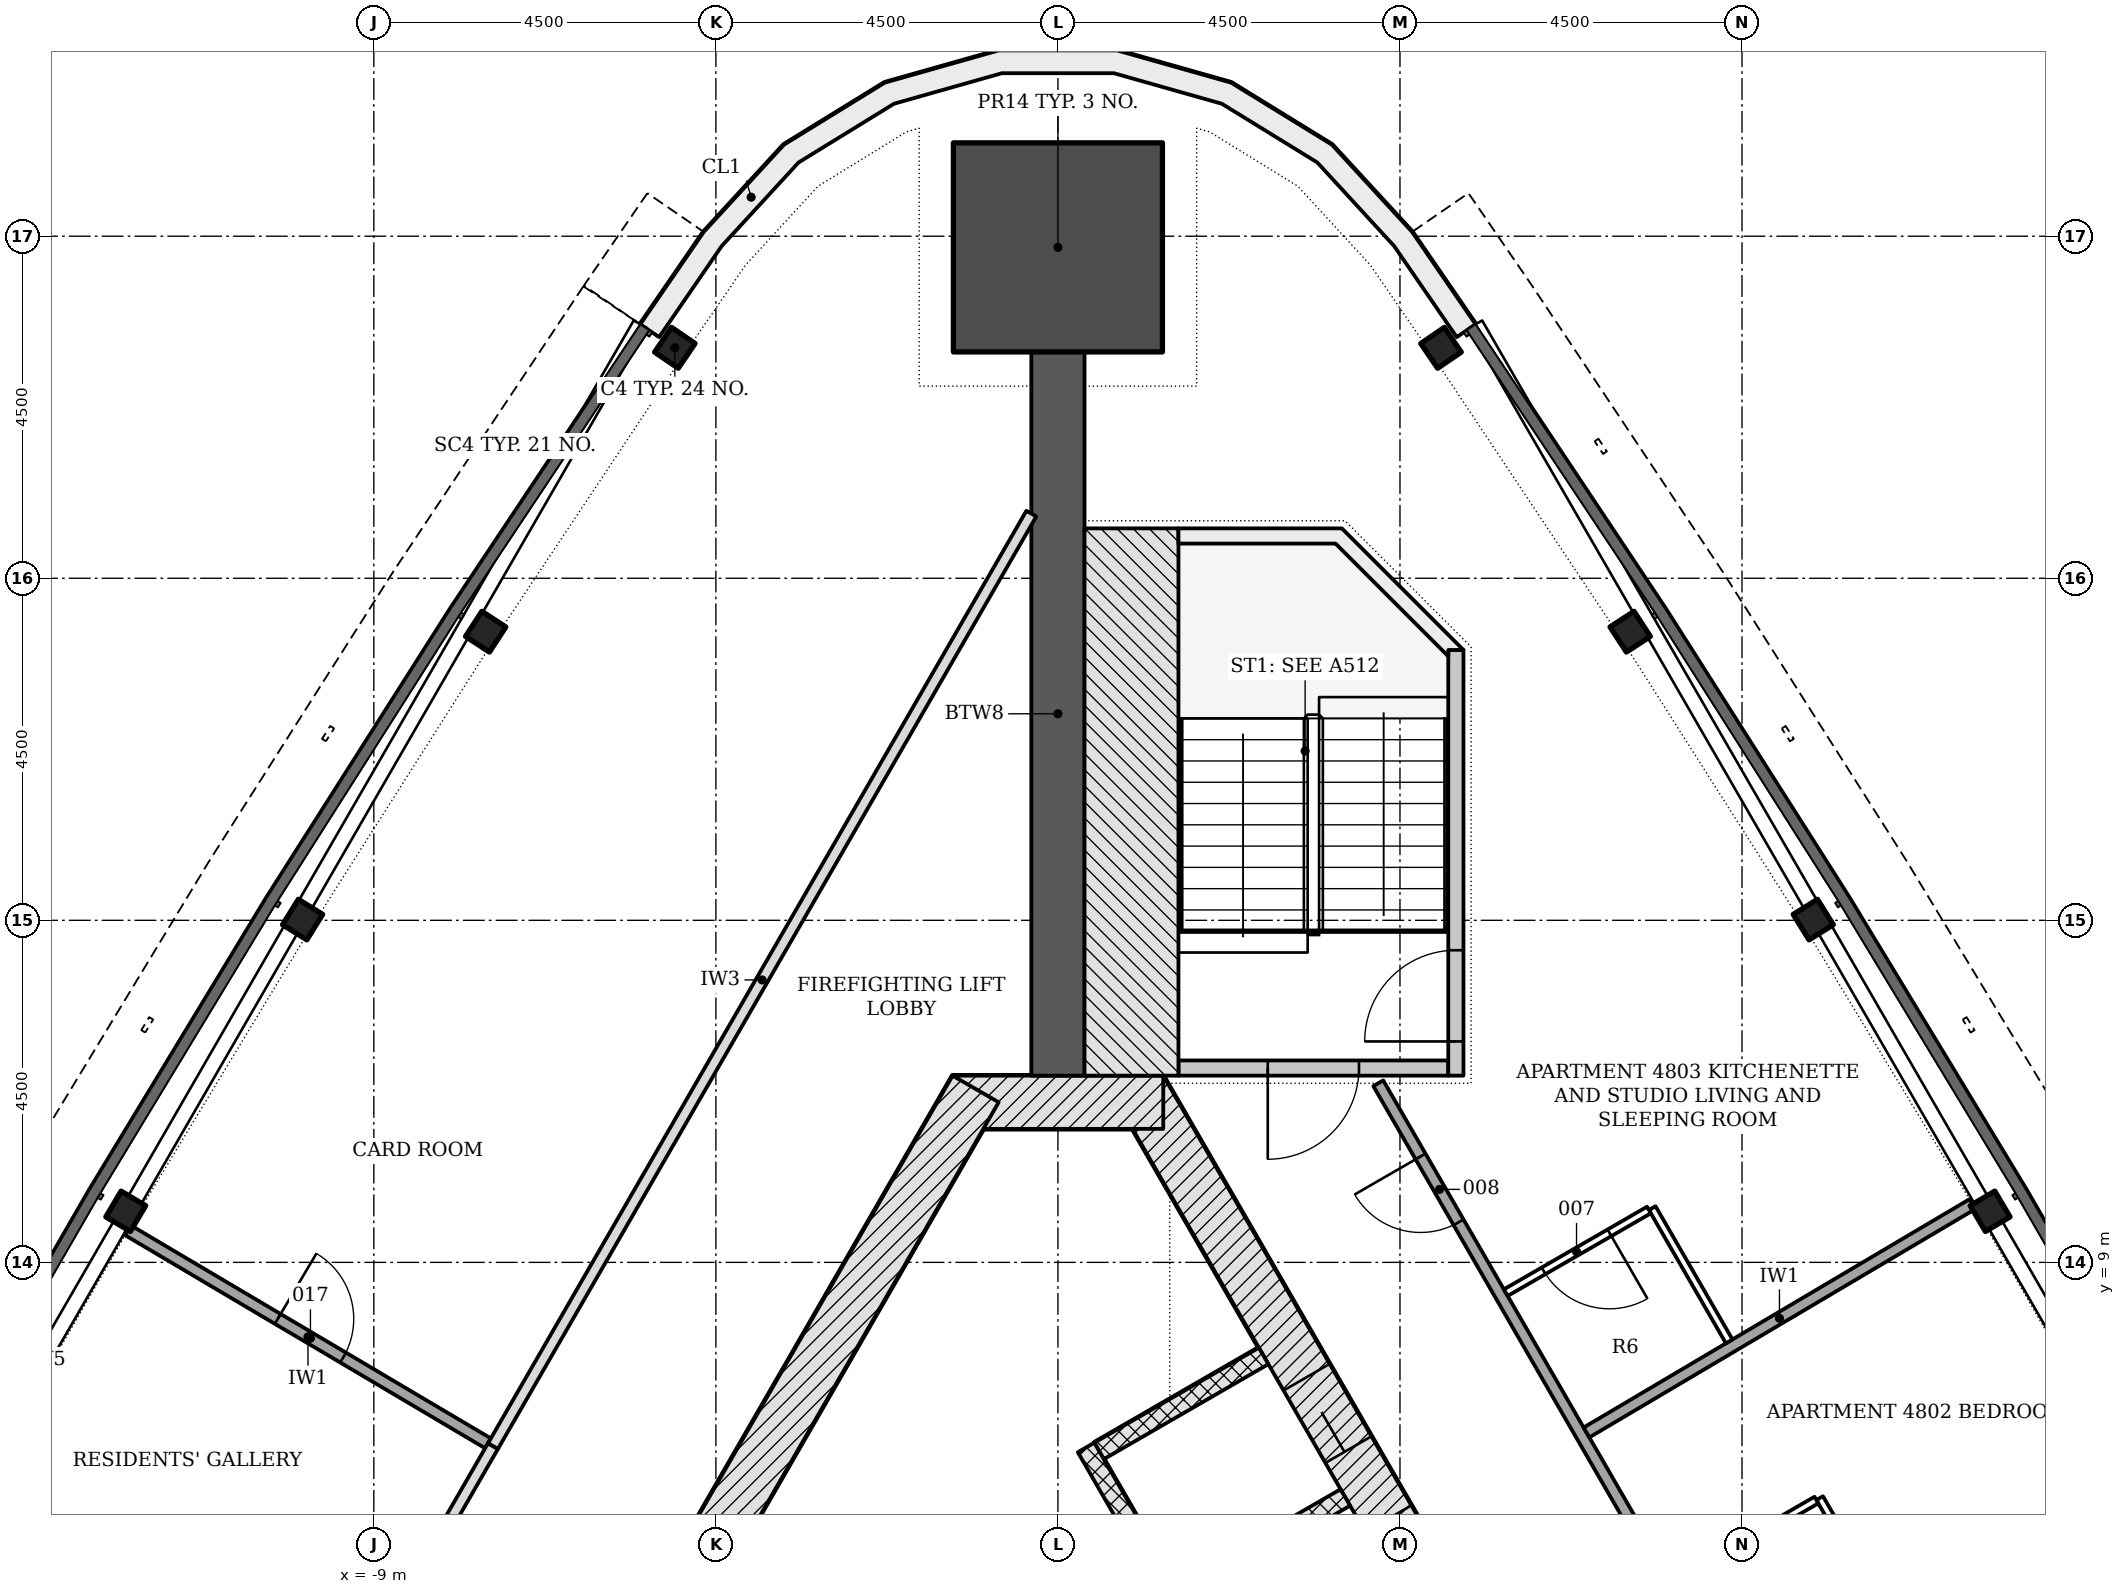
"""IFC4 building model, lengths in metres.
Left out: names, types, materials, properties, quantities, classifications, styles, units other than length and angle.
Written with IfcOpenShell. Run it as: python <this file> out.ifc"""

import sys

from ifc_helpers import new_model, si_unit, direction, frame, frame_2d, origin, origin_2d, place, context, subcontext, project, spatial, polyline, rectangle, i_section, outline, extrude, element, fill, save


model = new_model("IFC4")
c1 = context("Model", 3, precision=1e-05, world=origin(), true_north=direction((0.0, 1.0)))
c2 = subcontext(c1, "Body", "Model", "MODEL_VIEW")
j1 = project(units=[si_unit("LENGTHUNIT", "METRE"), si_unit("PLANEANGLEUNIT", "RADIAN")], contexts=[c1])
p1 = place(None, origin())
s1 = spatial("IfcSite", under=j1, at=p1, CompositionType="ELEMENT")
p2 = place(p1, origin())
s2 = spatial("IfcBuilding", under=s1, at=p2, CompositionType="ELEMENT")
p3 = place(p2, frame((0.0, 0.0, 188.7)))
s3 = spatial("IfcBuildingStorey", under=s2, at=p3, CompositionType="ELEMENT", Elevation=188.7)
p4 = place(p3, frame((10.311, -4.703, -0.2), z_axis=(0.0, 0.0, 1.0), x_axis=(-0.500001446645, 0.866024568562, 0.0)))
e1 = element("IfcWall", 1, at=p4, inside=s3, PredefinedType="SHEAR", context=c2, shape_type="SweptSolid", body=[
    extrude(rectangle(XDim=18.458, YDim=0.7, at=frame_2d((9.229, 0.0))), origin(), (0.0, 0.0, 1.0), 3.6),
])
p5 = place(p4, frame((4.379, 0.0, 0.2)))
e2 = element("IfcOpeningElement", 2, at=p5, cuts=e1, PredefinedType="OPENING", context=c2, shape_type="SweptSolid", body=[
    extrude(rectangle(XDim=1.1, YDim=2.1, at=frame_2d((0.55, 1.05))), frame((0.0, 0.36, 0.0), z_axis=(0.0, -1.0, 0.0), x_axis=(1.0, 0.0, 0.0)), (0.0, 0.0, 1.0), 0.72),
])
p6 = place(p4, frame((6.529, 0.0, 0.2)))
e3 = element("IfcOpeningElement", 3, at=p6, cuts=e1, PredefinedType="OPENING", context=c2, shape_type="SweptSolid", body=[
    extrude(rectangle(XDim=1.1, YDim=2.1, at=frame_2d((0.55, 1.05))), frame((0.0, 0.36, 0.0), z_axis=(0.0, -1.0, 0.0), x_axis=(1.0, 0.0, 0.0)), (0.0, 0.0, 1.0), 0.72),
])
p7 = place(p4, frame((8.679, 0.0, 0.2)))
e4 = element("IfcOpeningElement", 4, at=p7, cuts=e1, PredefinedType="OPENING", context=c2, shape_type="SweptSolid", body=[
    extrude(rectangle(XDim=1.1, YDim=2.1, at=frame_2d((0.55, 1.05))), frame((0.0, 0.36, 0.0), z_axis=(0.0, -1.0, 0.0), x_axis=(1.0, 0.0, 0.0)), (0.0, 0.0, 1.0), 0.72),
])
p8 = place(p4, frame((10.829, 0.0, 0.2)))
e5 = element("IfcOpeningElement", 5, at=p8, cuts=e1, PredefinedType="OPENING", context=c2, shape_type="SweptSolid", body=[
    extrude(rectangle(XDim=1.1, YDim=2.1, at=frame_2d((0.55, 1.05))), frame((0.0, 0.36, 0.0), z_axis=(0.0, -1.0, 0.0), x_axis=(1.0, 0.0, 0.0)), (0.0, 0.0, 1.0), 0.72),
])
p9 = place(p4, frame((12.979, 0.0, 0.2)))
e6 = element("IfcOpeningElement", 6, at=p9, cuts=e1, PredefinedType="OPENING", context=c2, shape_type="SweptSolid", body=[
    extrude(rectangle(XDim=1.1, YDim=2.1, at=frame_2d((0.55, 1.05))), frame((0.0, 0.36, 0.0), z_axis=(0.0, -1.0, 0.0), x_axis=(1.0, 0.0, 0.0)), (0.0, 0.0, 1.0), 0.72),
])
p10 = place(p3, frame((1.386, 11.106, -0.2), z_axis=(0.0, 0.0, 1.0), x_axis=(-1.0, 0.0, 0.0)))
e7 = element("IfcWall", 7, at=p10, inside=s3, PredefinedType="SHEAR", context=c2, shape_type="SweptSolid", body=[
    extrude(rectangle(XDim=2.771, YDim=0.7, at=frame_2d((1.386, 0.0))), origin(), (0.0, 0.0, 1.0), 3.6),
])
p11 = place(p3, frame((-1.083, 11.281, -0.2), z_axis=(0.0, 0.0, 1.0), x_axis=(-0.500001446645, -0.866024568562, 0.0)))
e8 = element("IfcWall", 8, at=p11, inside=s3, PredefinedType="SHEAR", context=c2, shape_type="SweptSolid", body=[
    extrude(rectangle(XDim=18.458, YDim=0.7, at=frame_2d((9.229, 0.0))), origin(), (0.0, 0.0, 1.0), 3.6),
])
p12 = place(p11, frame((8.979, 0.0, 0.2)))
e9 = element("IfcOpeningElement", 9, at=p12, cuts=e8, PredefinedType="OPENING", context=c2, shape_type="SweptSolid", body=[
    extrude(rectangle(XDim=1.2, YDim=2.1, at=frame_2d((0.6, 1.05))), frame((0.0, 0.36, 0.0), z_axis=(0.0, -1.0, 0.0), x_axis=(1.0, 0.0, 0.0)), (0.0, 0.0, 1.0), 0.72),
])
p13 = place(p11, frame((11.029, 0.0, 0.2)))
e10 = element("IfcOpeningElement", 10, at=p13, cuts=e8, PredefinedType="OPENING", context=c2, shape_type="SweptSolid", body=[
    extrude(rectangle(XDim=1.2, YDim=2.1, at=frame_2d((0.6, 1.05))), frame((0.0, 0.36, 0.0), z_axis=(0.0, -1.0, 0.0), x_axis=(1.0, 0.0, 0.0)), (0.0, 0.0, 1.0), 0.72),
])
p14 = place(p3, frame((0.0, 11.456, -0.2), z_axis=(0.0, 0.0, 1.0), x_axis=(0.0, 1.0, 0.0)))
e11 = element("IfcWall", 11, at=p14, inside=s3, PredefinedType="SHEAR", context=c2, shape_type="SweptSolid", body=[
    extrude(rectangle(XDim=9.522, YDim=0.7, at=frame_2d((4.761, 0.0))), origin(), (0.0, 0.0, 1.0), 3.6),
])
p15 = place(p3, frame((0.0, 22.353, -0.2), z_axis=(0.0, 0.0, 1.0), x_axis=(0.0, 1.0, 0.0)))
e12 = element("IfcColumn", 12, at=p15, inside=s3, PredefinedType="COLUMN", context=c2, shape_type="SweptSolid", body=[
    extrude(rectangle(XDim=2.75, YDim=2.75, at=origin_2d()), origin(), (0.0, 0.0, 1.0), 3.6),
])
for number, where, z_axis, x_axis in (
    (13, (-5.04, 21.032, -0.2), (0.0, 0.0, 1.0), (-0.563, -0.826, 0.0)),
    (14, (-7.529, 17.297, -0.2), (0.0, 0.0, 1.0), (-0.546, -0.838, 0.0)),
    (15, (-9.937, 13.51, -0.2), (0.0, 0.0, 1.0), (-0.528, -0.85, 0.0)),
    (16, (-12.264, 9.672, -0.2), (0.0, 0.0, 1.0), (-0.509, -0.861, 0.0)),
    (17, (12.264, 9.672, -0.2), (0.0, 0.0, 1.0), (-0.509, 0.861, 0.0)),
    (18, (9.937, 13.51, -0.2), (0.0, 0.0, 1.0), (-0.528, 0.85, 0.0)),
    (19, (7.529, 17.297, -0.2), (0.0, 0.0, 1.0), (-0.546, 0.838, 0.0)),
    (20, (5.04, 21.032, -0.2), (0.0, 0.0, 1.0), (-0.563, 0.826, 0.0)),
):
    element("IfcColumn", number, at=place(p3, frame(where, z_axis=z_axis, x_axis=x_axis)), inside=s3, PredefinedType="COLUMN", context=c2, shape_type="SweptSolid", body=[
        extrude(i_section(OverallWidth=0.394, OverallDepth=0.376, WebThickness=0.017, FlangeThickness=0.028, FilletRadius=0.015, at=origin_2d()), origin(), (0.0, 0.0, 1.0), 3.6),
    ])
p16 = place(p3, origin())
e21 = element("IfcWall", 21, at=p16, inside=s3, PredefinedType="NOTDEFINED", context=c2, shape_type="SweptSolid", body=[
    extrude(outline(polyline([(5.494, 21.342), (4.659, 22.557), (3.605, 23.704), (2.278, 24.52), (0.779, 24.944), (-0.779, 24.944), (-2.278, 24.52), (-3.605, 23.704), (-4.659, 22.557), (-5.494, 21.342), (-5.247, 21.172), (-4.424, 22.369), (-3.412, 23.47), (-2.156, 24.243), (-0.737, 24.644), (0.737, 24.644), (2.156, 24.243), (3.412, 23.47), (4.424, 22.369), (5.247, 21.172), (5.494, 21.342)])), origin(), (0.0, 0.0, 1.0), 3.3),
])
for number, where, z_axis, x_axis in (
    (22, (3.781, 5.907, -0.2), (0.0, 0.0, 1.0), (-0.866, -0.5, 0.0)),
    (23, (2.706, 7.769, -0.2), (0.0, 0.0, 1.0), (-0.866, -0.5, 0.0)),
):
    element("IfcWall", number, at=place(p3, frame(where, z_axis=z_axis, x_axis=x_axis)), inside=s3, PredefinedType="PARTITIONING", context=c2, shape_type="SweptSolid", body=[
        extrude(rectangle(XDim=2.5, YDim=0.25, at=frame_2d((1.25, 0.0))), origin(), (0.0, 0.0, 1.0), 3.6),
    ])
p17 = place(p3, frame((5.87, -2.961, 0.0), z_axis=(0.0, 0.0, 1.0), x_axis=(-0.50000615651, 0.866021849293, 0.0)))
e24 = element("IfcWall", 24, at=p17, inside=s3, PredefinedType="PARTITIONING", context=c2, shape_type="SweptSolid", body=[
    extrude(rectangle(XDim=11.0, YDim=0.25, at=frame_2d((5.5, 0.0))), origin(), (0.0, 0.0, 1.0), 3.4),
])
p18 = place(p3, frame((5.135, 11.556, -0.2), z_axis=(0.0, 0.0, 1.0), x_axis=(-1.0, 0.0, 0.0)))
e25 = element("IfcWall", 25, at=p18, inside=s3, PredefinedType="SHEAR", context=c2, shape_type="SweptSolid", body=[
    extrude(rectangle(XDim=3.55, YDim=0.2, at=frame_2d((1.775, 0.0))), origin(), (0.0, 0.0, 1.0), 3.6),
])
p19 = place(p18, frame((1.175, 0.0, 0.2)))
e26 = element("IfcOpeningElement", 26, at=p19, cuts=e25, PredefinedType="OPENING", context=c2, shape_type="SweptSolid", body=[
    extrude(rectangle(XDim=1.2, YDim=2.1, at=frame_2d((0.6, 1.05))), frame((0.0, 0.11, 0.0), z_axis=(0.0, -1.0, 0.0), x_axis=(1.0, 0.0, 0.0)), (0.0, 0.0, 1.0), 0.22),
])
p20 = place(p3, frame((5.236, 11.456, -0.2), z_axis=(0.0, 0.0, 1.0), x_axis=(0.0, 1.0, 0.0)))
e27 = element("IfcWall", 27, at=p20, inside=s3, PredefinedType="SHEAR", context=c2, shape_type="SweptSolid", body=[
    extrude(rectangle(XDim=5.6, YDim=0.2, at=frame_2d((2.8, 0.0))), origin(), (0.0, 0.0, 1.0), 3.6),
])
p21 = place(p20, frame((0.45, 0.0, 0.2)))
e28 = element("IfcOpeningElement", 28, at=p21, cuts=e27, PredefinedType="OPENING", context=c2, shape_type="SweptSolid", body=[
    extrude(rectangle(XDim=1.2, YDim=2.1, at=frame_2d((0.6, 1.05))), frame((0.0, 0.11, 0.0), z_axis=(0.0, -1.0, 0.0), x_axis=(1.0, 0.0, 0.0)), (0.0, 0.0, 1.0), 0.22),
])
p22 = place(p3, frame((0.968, 11.456, -0.2), z_axis=(0.0, 0.0, 1.0), x_axis=(0.0, 1.0, 0.0)))
e29 = element("IfcWall", 29, at=p22, inside=s3, PredefinedType="SHEAR", context=c2, shape_type="SweptSolid", body=[
    extrude(rectangle(XDim=7.2, YDim=1.236, at=frame_2d((3.6, 0.0))), origin(), (0.0, 0.0, 1.0), 3.6),
])
p23 = place(p3, frame((0.0, 0.0, -0.2)))
e30 = element("IfcWall", 30, at=p23, inside=s3, PredefinedType="SHEAR", context=c2, shape_type="SweptSolid", body=[
    extrude(outline(polyline([(5.336, 17.056), (3.736, 18.656), (1.586, 18.656), (1.586, 18.456), (3.653, 18.456), (5.135, 16.974), (5.135, 17.056), (5.135, 17.056), (5.135, 17.056), (5.135, 17.056), (5.135, 17.056), (5.135, 17.056), (5.135, 17.056), (5.135, 17.056), (5.135, 17.056), (5.135, 17.056), (5.135, 17.056), (5.135, 17.056), (5.135, 17.056), (5.135, 17.056), (5.135, 17.056), (5.135, 17.056), (5.135, 17.056), (5.336, 17.056)])), origin(), (0.0, 0.0, 1.0), 3.6),
])
p24 = place(p3, frame((11.247, -0.824, 0.0), z_axis=(0.0, 0.0, 1.0), x_axis=(-0.499997921847, 0.866026603603, 0.0)))
e31 = element("IfcWall", 31, at=p24, inside=s3, PredefinedType="PARTITIONING", context=c2, shape_type="SweptSolid", body=[
    extrude(rectangle(XDim=14.065, YDim=0.15, at=frame_2d((7.032, 0.0))), origin(), (0.0, 0.0, 1.0), 2.852),
])
p25 = place(p24, frame((11.953, 0.0, 0.0)))
e32 = element("IfcOpeningElement", 32, at=p25, cuts=e31, PredefinedType="OPENING", context=c2, shape_type="SweptSolid", body=[
    extrude(rectangle(XDim=1.0, YDim=2.1, at=frame_2d((0.5, 1.05))), frame((0.0, 0.085, 0.0), z_axis=(0.0, -1.0, 0.0), x_axis=(1.0, 0.0, 0.0)), (0.0, 0.0, 1.0), 0.17),
])
p26 = place(p3, frame((14.277, 5.885, 0.0), z_axis=(0.0, 0.0, 1.0), x_axis=(-0.871335785584, -0.490687220907, 0.0)))
e33 = element("IfcWall", 33, at=p26, inside=s3, PredefinedType="PARTITIONING", context=c2, shape_type="SweptSolid", body=[
    extrude(rectangle(XDim=5.904, YDim=0.1, at=frame_2d((2.952, 0.0))), origin(), (0.0, 0.0, 1.0), 2.461),
])
p27 = place(p26, frame((1.339, 0.0, 0.0)))
e34 = element("IfcOpeningElement", 34, at=p27, cuts=e33, PredefinedType="OPENING", context=c2, shape_type="SweptSolid", body=[
    extrude(rectangle(XDim=1.0, YDim=2.1, at=frame_2d((0.5, 1.05))), frame((0.0, 0.06, 0.0), z_axis=(0.0, -1.0, 0.0), x_axis=(1.0, 0.0, 0.0)), (0.0, 0.0, 1.0), 0.12),
])
p28 = place(p26, frame((4.329, 0.0, 0.0)))
e35 = element("IfcOpeningElement", 35, at=p28, cuts=e33, PredefinedType="OPENING", context=c2, shape_type="SweptSolid", body=[
    extrude(rectangle(XDim=1.0, YDim=2.1, at=frame_2d((0.5, 1.05))), frame((0.0, 0.06, 0.0), z_axis=(0.0, -1.0, 0.0), x_axis=(1.0, 0.0, 0.0)), (0.0, 0.0, 1.0), 0.12),
])
p29 = place(p3, frame((11.047, 4.123, 0.0), z_axis=(0.0, 0.0, 1.0), x_axis=(-0.500007699544, 0.866020958405, 0.0)))
e36 = element("IfcWall", 36, at=p29, inside=s3, PredefinedType="PARTITIONING", context=c2, shape_type="SweptSolid", body=[
    extrude(rectangle(XDim=2.05, YDim=0.1, at=frame_2d((1.025, 0.0))), origin(), (0.0, 0.0, 1.0), 2.852),
])
p30 = place(p3, frame((9.979, 5.873, 0.0), z_axis=(0.0, 0.0, 1.0), x_axis=(-0.866037911478, -0.499978335414, 0.0)))
e37 = element("IfcWall", 37, at=p30, inside=s3, PredefinedType="PARTITIONING", context=c2, shape_type="SweptSolid", body=[
    extrude(rectangle(XDim=2.175, YDim=0.1, at=frame_2d((1.087, 0.0))), origin(), (0.0, 0.0, 1.0), 2.852),
])
p31 = place(p3, frame((12.031, 9.766, 0.0), z_axis=(0.0, 0.0, 1.0), x_axis=(-0.860638865546, -0.509215811922, 0.0)))
e38 = element("IfcWall", 38, at=p31, inside=s3, PredefinedType="PARTITIONING", context=c2, shape_type="SweptSolid", body=[
    extrude(rectangle(XDim=5.9, YDim=0.15, at=frame_2d((2.95, 0.0))), origin(), (0.0, 0.0, 1.0), 2.461),
])
p32 = place(p3, frame((8.831, 7.96, 0.0), z_axis=(0.0, 0.0, 1.0), x_axis=(-0.499990325971, 0.866030989016, 0.0)))
e39 = element("IfcWall", 39, at=p32, inside=s3, PredefinedType="PARTITIONING", context=c2, shape_type="SweptSolid", body=[
    extrude(rectangle(XDim=2.025, YDim=0.1, at=frame_2d((1.012, 0.0))), origin(), (0.0, 0.0, 1.0), 2.852),
])
p33 = place(p3, frame((7.775, 9.689, 0.0), z_axis=(0.0, 0.0, 1.0), x_axis=(-0.865989304205, -0.500062521093, 0.0)))
e40 = element("IfcWall", 40, at=p33, inside=s3, PredefinedType="PARTITIONING", context=c2, shape_type="SweptSolid", body=[
    extrude(rectangle(XDim=2.175, YDim=0.1, at=frame_2d((1.087, 0.0))), origin(), (0.0, 0.0, 1.0), 2.852),
])
p34 = place(p33, frame((0.6, 0.0, 0.0)))
e41 = element("IfcOpeningElement", 41, at=p34, cuts=e40, PredefinedType="OPENING", context=c2, shape_type="SweptSolid", body=[
    extrude(rectangle(XDim=1.0, YDim=2.1, at=frame_2d((0.5, 1.05))), frame((0.0, 0.06, 0.0), z_axis=(0.0, -1.0, 0.0), x_axis=(1.0, 0.0, 0.0)), (0.0, 0.0, 1.0), 0.12),
])
p35 = place(p3, frame((-0.35, 18.85, 0.0), z_axis=(0.0, 0.0, 1.0), x_axis=(-0.500005388685, -0.866022292603, 0.0)))
e42 = element("IfcWall", 42, at=p35, inside=s3, PredefinedType="PARTITIONING", context=c2, shape_type="SweptSolid", body=[
    extrude(rectangle(XDim=14.167, YDim=0.15, at=frame_2d((7.083, 0.0))), origin(), (0.0, 0.0, 1.0), 2.852),
])
p36 = place(p3, frame((-12.235, 9.422, 0.0), z_axis=(0.0, 0.0, 1.0), x_axis=(0.860631434237, -0.509228371562, 0.0)))
e43 = element("IfcWall", 43, at=p36, inside=s3, PredefinedType="PARTITIONING", context=c2, shape_type="SweptSolid", body=[
    extrude(rectangle(XDim=5.504, YDim=0.15, at=frame_2d((2.752, 0.0))), origin(), (0.0, 0.0, 1.0), 2.461),
])
p37 = place(p36, frame((2.29, 0.0, 0.0)))
e44 = element("IfcOpeningElement", 44, at=p37, cuts=e43, PredefinedType="OPENING", context=c2, shape_type="SweptSolid", body=[
    extrude(rectangle(XDim=1.0, YDim=2.1, at=frame_2d((0.5, 1.05))), frame((0.0, 0.085, 0.0), z_axis=(0.0, -1.0, 0.0), x_axis=(1.0, 0.0, 0.0)), (0.0, 0.0, 1.0), 0.17),
])
p38 = place(p3, frame((-7.434, 6.581, 0.0), z_axis=(0.0, 0.0, 1.0), x_axis=(-0.499964504253, -0.866045896294, 0.0)))
e45 = element("IfcWall", 45, at=p38, inside=s3, PredefinedType="PARTITIONING", context=c2, shape_type="SweptSolid", body=[
    extrude(rectangle(XDim=4.365, YDim=0.15, at=frame_2d((2.183, 0.0))), origin(), (0.0, 0.0, 1.0), 2.852),
])
p39 = place(p38, frame((1.683, 0.0, 0.0)))
e46 = element("IfcOpeningElement", 46, at=p39, cuts=e45, PredefinedType="OPENING", context=c2, shape_type="SweptSolid", body=[
    extrude(rectangle(XDim=1.0, YDim=2.1, at=frame_2d((0.5, 1.05))), frame((0.0, 0.085, 0.0), z_axis=(0.0, -1.0, 0.0), x_axis=(1.0, 0.0, 0.0)), (0.0, 0.0, 1.0), 0.17),
])
p40 = place(p9, origin())
e47 = element("IfcDoor", 47, at=p40, inside=s3, OperationType="DOUBLE_DOOR_SLIDING", PredefinedType="DOOR", context=c2, shape_type="SweptSolid", body=[
    extrude(rectangle(XDim=1.1, YDim=2.1, at=frame_2d((0.55, 1.05))), frame((0.0, 0.025, 0.0), z_axis=(0.0, -1.0, 0.0), x_axis=(1.0, 0.0, 0.0)), (0.0, 0.0, 1.0), 0.05),
])
fill(e6, e47)
p41 = place(p19, origin())
e48 = element("IfcDoor", 48, at=p41, inside=s3, OperationType="SINGLE_SWING_RIGHT", PredefinedType="DOOR", context=c2, shape_type="SweptSolid", body=[
    extrude(rectangle(XDim=1.2, YDim=2.1, at=frame_2d((0.6, 1.05))), frame((0.0, 0.025, 0.0), z_axis=(0.0, -1.0, 0.0), x_axis=(1.0, 0.0, 0.0)), (0.0, 0.0, 1.0), 0.05),
])
fill(e26, e48)
p42 = place(p21, origin())
e49 = element("IfcDoor", 49, at=p42, inside=s3, OperationType="SINGLE_SWING_LEFT", PredefinedType="DOOR", context=c2, shape_type="SweptSolid", body=[
    extrude(rectangle(XDim=1.2, YDim=2.1, at=frame_2d((0.6, 1.05))), frame((0.0, 0.025, 0.0), z_axis=(0.0, -1.0, 0.0), x_axis=(1.0, 0.0, 0.0)), (0.0, 0.0, 1.0), 0.05),
])
fill(e28, e49)
p43 = place(p34, origin())
e50 = element("IfcDoor", 50, at=p43, inside=s3, OperationType="SINGLE_SWING_LEFT", PredefinedType="DOOR", context=c2, shape_type="SweptSolid", body=[
    extrude(rectangle(XDim=1.0, YDim=2.1, at=frame_2d((0.5, 1.05))), frame((0.0, 0.025, 0.0), z_axis=(0.0, -1.0, 0.0), x_axis=(1.0, 0.0, 0.0)), (0.0, 0.0, 1.0), 0.05),
])
fill(e41, e50)
p44 = place(p25, origin())
e51 = element("IfcDoor", 51, at=p44, inside=s3, OperationType="SINGLE_SWING_RIGHT", PredefinedType="DOOR", context=c2, shape_type="SweptSolid", body=[
    extrude(rectangle(XDim=1.0, YDim=2.1, at=frame_2d((0.5, 1.05))), frame((0.0, 0.025, 0.0), z_axis=(0.0, -1.0, 0.0), x_axis=(1.0, 0.0, 0.0)), (0.0, 0.0, 1.0), 0.05),
])
fill(e32, e51)
p45 = place(p37, origin())
e52 = element("IfcDoor", 52, at=p45, inside=s3, OperationType="SINGLE_SWING_LEFT", PredefinedType="DOOR", context=c2, shape_type="SweptSolid", body=[
    extrude(rectangle(XDim=1.0, YDim=2.1, at=frame_2d((0.5, 1.05))), frame((0.0, 0.025, 0.0), z_axis=(0.0, -1.0, 0.0), x_axis=(1.0, 0.0, 0.0)), (0.0, 0.0, 1.0), 0.05),
])
fill(e44, e52)
save(model, sys.argv[1])
